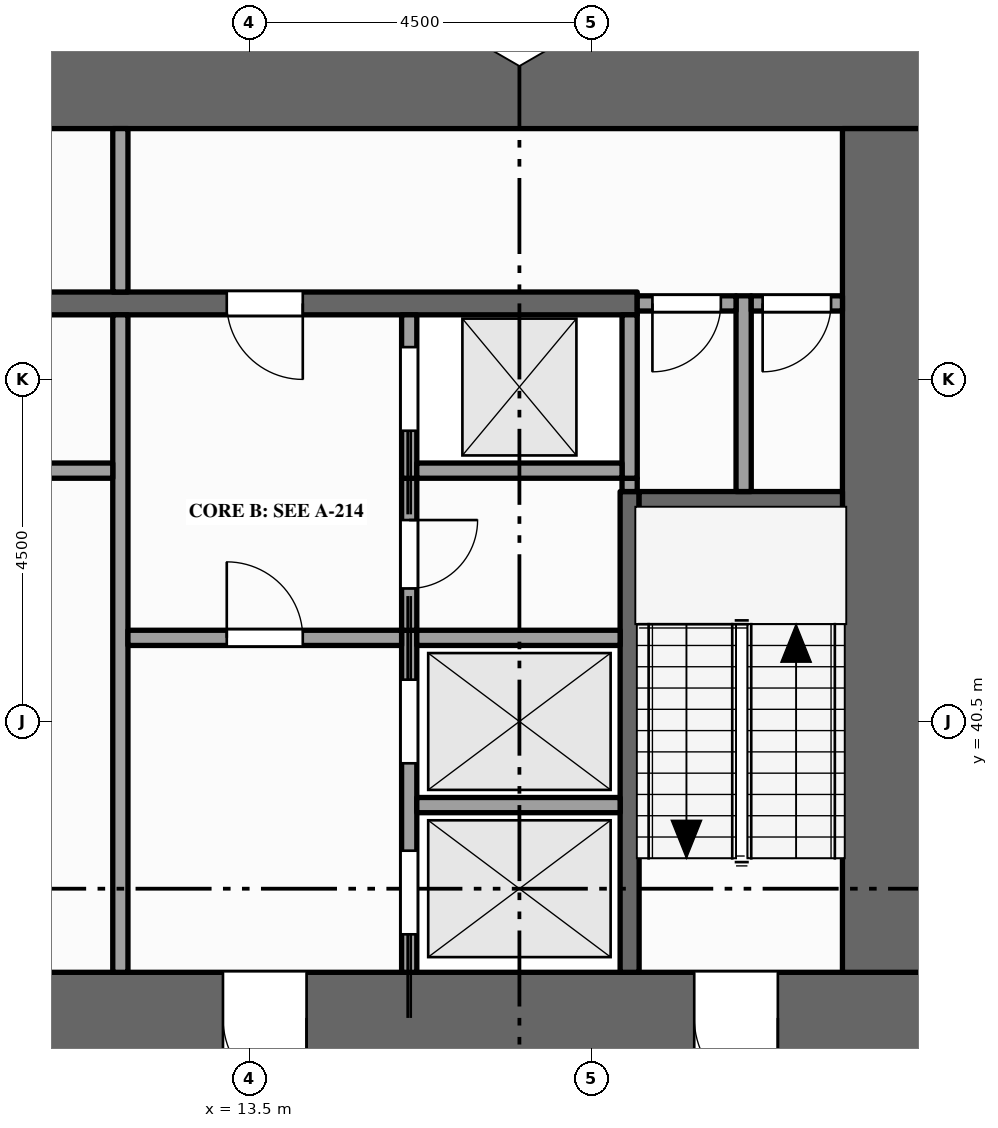
"""IFC4 building model, lengths in metres.
Left out: names, types, materials, properties, quantities, classifications, styles, units other than length and angle.
Written with IfcOpenShell. Run it as: python <this file> out.ifc"""

import sys

from ifc_helpers import new_model, si_unit, direction, frame, frame_2d, origin, place, context, subcontext, project, spatial, rectangle, extrude, element, fill, save


model = new_model("IFC4")
c1 = context("Model", 3, precision=1e-05, world=origin(), true_north=direction((0.0, 1.0)))
c2 = subcontext(c1, "Body", "Model", "MODEL_VIEW")
j1 = project(units=[si_unit("LENGTHUNIT", "METRE"), si_unit("PLANEANGLEUNIT", "RADIAN")], contexts=[c1])
p1 = place(None, origin())
s1 = spatial("IfcSite", under=j1, at=p1, CompositionType="ELEMENT")
p2 = place(p1, origin())
s2 = spatial("IfcBuilding", under=s1, at=p2, CompositionType="ELEMENT")
p3 = place(p2, frame((0.0, 0.0, 73.0)))
s3 = spatial("IfcBuildingStorey", under=s2, at=p3, CompositionType="ELEMENT", Elevation=73.0)
p4 = place(p3, frame((0.0, 36.6, -0.15), z_axis=(0.0, 0.0, 1.0), x_axis=(1.0, 0.0, 0.0)))
e1 = element("IfcWall", 1, at=p4, inside=s3, PredefinedType="SHEAR", context=c2, shape_type="SweptSolid", body=[
    extrude(rectangle(XDim=22.5, YDim=1.2, at=frame_2d((11.25, 0.0))), origin(), (0.0, 0.0, 1.0), 4.0),
])
p5 = place(p4, frame((7.1, 0.0, 0.15)))
e2 = element("IfcOpeningElement", 2, at=p5, cuts=e1, PredefinedType="OPENING", context=c2, shape_type="SweptSolid", body=[
    extrude(rectangle(XDim=1.8, YDim=2.1, at=frame_2d((0.9, 1.05))), frame((0.0, 0.61, 0.0), z_axis=(0.0, -1.0, 0.0), x_axis=(1.0, 0.0, 0.0)), (0.0, 0.0, 1.0), 1.22),
])
p6 = place(p4, frame((13.15, 0.0, 0.15)))
e3 = element("IfcOpeningElement", 3, at=p6, cuts=e1, PredefinedType="OPENING", context=c2, shape_type="SweptSolid", body=[
    extrude(rectangle(XDim=1.1, YDim=2.1, at=frame_2d((0.55, 1.05))), frame((0.0, 0.61, 0.0), z_axis=(0.0, -1.0, 0.0), x_axis=(1.0, 0.0, 0.0)), (0.0, 0.0, 1.0), 1.22),
])
p7 = place(p4, frame((2.15, 0.0, 0.15)))
e4 = element("IfcOpeningElement", 4, at=p7, cuts=e1, PredefinedType="OPENING", context=c2, shape_type="SweptSolid", body=[
    extrude(rectangle(XDim=1.1, YDim=2.1, at=frame_2d((0.55, 1.05))), frame((0.0, 0.61, 0.0), z_axis=(0.0, -1.0, 0.0), x_axis=(1.0, 0.0, 0.0)), (0.0, 0.0, 1.0), 1.22),
])
p8 = place(p4, frame((19.35, 0.0, 0.15)))
e5 = element("IfcOpeningElement", 5, at=p8, cuts=e1, PredefinedType="OPENING", context=c2, shape_type="SweptSolid", body=[
    extrude(rectangle(XDim=1.1, YDim=2.1, at=frame_2d((0.55, 1.05))), frame((0.0, 0.61, 0.0), z_axis=(0.0, -1.0, 0.0), x_axis=(1.0, 0.0, 0.0)), (0.0, 0.0, 1.0), 1.22),
])
p9 = place(p3, frame((0.0, 48.9, -0.15), z_axis=(0.0, 0.0, 1.0), x_axis=(1.0, 0.0, 0.0)))
e6 = element("IfcWall", 6, at=p9, inside=s3, PredefinedType="SHEAR", context=c2, shape_type="SweptSolid", body=[
    extrude(rectangle(XDim=22.5, YDim=1.2, at=frame_2d((11.25, 0.0))), origin(), (0.0, 0.0, 1.0), 4.0),
])
p10 = place(p3, frame((21.9, 37.2, -0.15), z_axis=(0.0, 0.0, 1.0), x_axis=(0.0, 1.0, 0.0)))
e7 = element("IfcWall", 7, at=p10, inside=s3, PredefinedType="SHEAR", context=c2, shape_type="SweptSolid", body=[
    extrude(rectangle(XDim=11.1, YDim=1.2, at=frame_2d((5.55, 0.0))), origin(), (0.0, 0.0, 1.0), 4.0),
])
p11 = place(p3, frame((11.8, 37.2, 0.0), z_axis=(0.0, 0.0, 1.0), x_axis=(0.0, 1.0, 0.0)))
e8 = element("IfcWall", 8, at=p11, inside=s3, PredefinedType="PARTITIONING", context=c2, shape_type="SweptSolid", body=[
    extrude(rectangle(XDim=8.65, YDim=0.2, at=frame_2d((4.325, 0.0))), origin(), (0.0, 0.0, 1.0), 3.75),
])
p12 = place(p3, frame((11.8, 46.15, 0.0), z_axis=(0.0, 0.0, 1.0), x_axis=(0.0, 1.0, 0.0)))
e9 = element("IfcWall", 9, at=p12, inside=s3, PredefinedType="PARTITIONING", context=c2, shape_type="SweptSolid", body=[
    extrude(rectangle(XDim=2.15, YDim=0.2, at=frame_2d((1.075, 0.0))), origin(), (0.0, 0.0, 1.0), 3.75),
])
p13 = place(p3, frame((15.6, 37.2, 0.0), z_axis=(0.0, 0.0, 1.0), x_axis=(0.0, 1.0, 0.0)))
e10 = element("IfcWall", 10, at=p13, inside=s3, PredefinedType="SOLIDWALL", context=c2, shape_type="SweptSolid", body=[
    extrude(rectangle(XDim=4.5, YDim=0.2, at=frame_2d((2.25, 0.0))), origin(), (0.0, 0.0, 1.0), 3.75),
])
p14 = place(p13, frame((0.5, 0.0, 0.012)))
e11 = element("IfcOpeningElement", 11, at=p14, cuts=e10, PredefinedType="OPENING", context=c2, shape_type="SweptSolid", body=[
    extrude(rectangle(XDim=1.1, YDim=2.1, at=frame_2d((0.55, 1.05))), frame((0.0, 0.11, 0.0), z_axis=(0.0, -1.0, 0.0), x_axis=(1.0, 0.0, 0.0)), (0.0, 0.0, 1.0), 0.22),
])
p15 = place(p13, frame((2.75, 0.0, 0.012)))
e12 = element("IfcOpeningElement", 12, at=p15, cuts=e10, PredefinedType="OPENING", context=c2, shape_type="SweptSolid", body=[
    extrude(rectangle(XDim=1.1, YDim=2.1, at=frame_2d((0.55, 1.05))), frame((0.0, 0.11, 0.0), z_axis=(0.0, -1.0, 0.0), x_axis=(1.0, 0.0, 0.0)), (0.0, 0.0, 1.0), 0.22),
])
p16 = place(p3, frame((15.6, 41.7, 0.0), z_axis=(0.0, 0.0, 1.0), x_axis=(0.0, 1.0, 0.0)))
e13 = element("IfcWall", 13, at=p16, inside=s3, PredefinedType="PARTITIONING", context=c2, shape_type="SweptSolid", body=[
    extrude(rectangle(XDim=2.0, YDim=0.2, at=frame_2d((1.0, 0.0))), origin(), (0.0, 0.0, 1.0), 3.75),
])
p17 = place(p16, frame((0.55, 0.0, 0.0)))
e14 = element("IfcOpeningElement", 14, at=p17, cuts=e13, PredefinedType="OPENING", context=c2, shape_type="SweptSolid", body=[
    extrude(rectangle(XDim=0.9, YDim=2.1, at=frame_2d((0.45, 1.05))), frame((0.0, 0.11, 0.0), z_axis=(0.0, -1.0, 0.0), x_axis=(1.0, 0.0, 0.0)), (0.0, 0.0, 1.0), 0.22),
])
p18 = place(p3, frame((15.6, 43.7, 0.0), z_axis=(0.0, 0.0, 1.0), x_axis=(0.0, 1.0, 0.0)))
e15 = element("IfcWall", 15, at=p18, inside=s3, PredefinedType="SOLIDWALL", context=c2, shape_type="SweptSolid", body=[
    extrude(rectangle(XDim=2.15, YDim=0.2, at=frame_2d((1.075, 0.0))), origin(), (0.0, 0.0, 1.0), 3.75),
])
p19 = place(p18, frame((0.625, 0.0, 0.012)))
e16 = element("IfcOpeningElement", 16, at=p19, cuts=e15, PredefinedType="OPENING", context=c2, shape_type="SweptSolid", body=[
    extrude(rectangle(XDim=1.1, YDim=2.1, at=frame_2d((0.55, 1.05))), frame((0.0, 0.11, 0.0), z_axis=(0.0, -1.0, 0.0), x_axis=(1.0, 0.0, 0.0)), (0.0, 0.0, 1.0), 0.22),
])
p20 = place(p3, frame((18.5, 37.2, 0.0), z_axis=(0.0, 0.0, 1.0), x_axis=(0.0, 1.0, 0.0)))
e17 = element("IfcWall", 17, at=p20, inside=s3, PredefinedType="SHEAR", context=c2, shape_type="SweptSolid", body=[
    extrude(rectangle(XDim=6.325, YDim=0.25, at=frame_2d((3.163, 0.0))), origin(), (0.0, 0.0, 1.0), 3.75),
])
p21 = place(p3, frame((18.5, 43.525, 0.0), z_axis=(0.0, 0.0, 1.0), x_axis=(0.0, 1.0, 0.0)))
e18 = element("IfcWall", 18, at=p21, inside=s3, PredefinedType="PARTITIONING", context=c2, shape_type="SweptSolid", body=[
    extrude(rectangle(XDim=0.175, YDim=0.2, at=frame_2d((0.087, 0.0))), origin(), (0.0, 0.0, 1.0), 3.75),
])
p22 = place(p3, frame((18.5, 43.7, 0.0), z_axis=(0.0, 0.0, 1.0), x_axis=(0.0, 1.0, 0.0)))
e19 = element("IfcWall", 19, at=p22, inside=s3, PredefinedType="SOLIDWALL", context=c2, shape_type="SweptSolid", body=[
    extrude(rectangle(XDim=2.15, YDim=0.2, at=frame_2d((1.075, 0.0))), origin(), (0.0, 0.0, 1.0), 3.75),
])
p23 = place(p3, frame((20.0, 43.525, 0.0), z_axis=(0.0, 0.0, 1.0), x_axis=(0.0, 1.0, 0.0)))
e20 = element("IfcWall", 20, at=p23, inside=s3, PredefinedType="PARTITIONING", context=c2, shape_type="SweptSolid", body=[
    extrude(rectangle(XDim=2.575, YDim=0.2, at=frame_2d((1.288, 0.0))), origin(), (0.0, 0.0, 1.0), 3.75),
])
p24 = place(p3, frame((15.7, 39.4, 0.0), z_axis=(0.0, 0.0, 1.0), x_axis=(1.0, 0.0, 0.0)))
e21 = element("IfcWall", 21, at=p24, inside=s3, PredefinedType="SOLIDWALL", context=c2, shape_type="SweptSolid", body=[
    extrude(rectangle(XDim=2.675, YDim=0.2, at=frame_2d((1.337, 0.0))), origin(), (0.0, 0.0, 1.0), 3.75),
])
p25 = place(p3, frame((11.9, 41.6, 0.0), z_axis=(0.0, 0.0, 1.0), x_axis=(1.0, 0.0, 0.0)))
e22 = element("IfcWall", 22, at=p25, inside=s3, PredefinedType="PARTITIONING", context=c2, shape_type="SweptSolid", body=[
    extrude(rectangle(XDim=3.6, YDim=0.2, at=frame_2d((1.8, 0.0))), origin(), (0.0, 0.0, 1.0), 3.75),
])
p26 = place(p25, frame((1.3, 0.0, 0.0)))
e23 = element("IfcOpeningElement", 23, at=p26, cuts=e22, PredefinedType="OPENING", context=c2, shape_type="SweptSolid", body=[
    extrude(rectangle(XDim=1.0, YDim=2.1, at=frame_2d((0.5, 1.05))), frame((0.0, 0.11, 0.0), z_axis=(0.0, -1.0, 0.0), x_axis=(1.0, 0.0, 0.0)), (0.0, 0.0, 1.0), 0.22),
])
p27 = place(p3, frame((15.7, 41.6, 0.0), z_axis=(0.0, 0.0, 1.0), x_axis=(1.0, 0.0, 0.0)))
e24 = element("IfcWall", 24, at=p27, inside=s3, PredefinedType="SOLIDWALL", context=c2, shape_type="SweptSolid", body=[
    extrude(rectangle(XDim=2.675, YDim=0.2, at=frame_2d((1.337, 0.0))), origin(), (0.0, 0.0, 1.0), 3.75),
])
p28 = place(p3, frame((18.625, 43.4, 0.0), z_axis=(0.0, 0.0, 1.0), x_axis=(1.0, 0.0, 0.0)))
e25 = element("IfcWall", 25, at=p28, inside=s3, PredefinedType="SHEAR", context=c2, shape_type="SweptSolid", body=[
    extrude(rectangle(XDim=2.675, YDim=0.25, at=frame_2d((1.337, 0.0))), origin(), (0.0, 0.0, 1.0), 3.75),
])
p29 = place(p3, frame((9.5, 43.8, 0.0), z_axis=(0.0, 0.0, 1.0), x_axis=(1.0, 0.0, 0.0)))
e26 = element("IfcWall", 26, at=p29, inside=s3, PredefinedType="PARTITIONING", context=c2, shape_type="SweptSolid", body=[
    extrude(rectangle(XDim=2.2, YDim=0.2, at=frame_2d((1.1, 0.0))), origin(), (0.0, 0.0, 1.0), 3.75),
])
p30 = place(p3, frame((15.7, 43.8, 0.0), z_axis=(0.0, 0.0, 1.0), x_axis=(1.0, 0.0, 0.0)))
e27 = element("IfcWall", 27, at=p30, inside=s3, PredefinedType="SOLIDWALL", context=c2, shape_type="SweptSolid", body=[
    extrude(rectangle(XDim=2.7, YDim=0.2, at=frame_2d((1.35, 0.0))), origin(), (0.0, 0.0, 1.0), 3.75),
])
p31 = place(p3, frame((4.1, 46.0, 0.0), z_axis=(0.0, 0.0, 1.0), x_axis=(1.0, 0.0, 0.0)))
e28 = element("IfcWall", 28, at=p31, inside=s3, PredefinedType="SHEAR", context=c2, shape_type="SweptSolid", body=[
    extrude(rectangle(XDim=14.5, YDim=0.3, at=frame_2d((7.25, 0.0))), origin(), (0.0, 0.0, 1.0), 3.75),
])
p32 = place(p31, frame((3.4, 0.0, 0.0)))
e29 = element("IfcOpeningElement", 29, at=p32, cuts=e28, PredefinedType="OPENING", context=c2, shape_type="SweptSolid", body=[
    extrude(rectangle(XDim=1.0, YDim=2.1, at=frame_2d((0.5, 1.05))), frame((0.0, 0.16, 0.0), z_axis=(0.0, -1.0, 0.0), x_axis=(1.0, 0.0, 0.0)), (0.0, 0.0, 1.0), 0.32),
])
p33 = place(p31, frame((9.1, 0.0, 0.0)))
e30 = element("IfcOpeningElement", 30, at=p33, cuts=e28, PredefinedType="OPENING", context=c2, shape_type="SweptSolid", body=[
    extrude(rectangle(XDim=1.0, YDim=2.1, at=frame_2d((0.5, 1.05))), frame((0.0, 0.16, 0.0), z_axis=(0.0, -1.0, 0.0), x_axis=(1.0, 0.0, 0.0)), (0.0, 0.0, 1.0), 0.32),
])
p34 = place(p3, frame((18.6, 46.0, 0.0), z_axis=(0.0, 0.0, 1.0), x_axis=(1.0, 0.0, 0.0)))
e31 = element("IfcWall", 31, at=p34, inside=s3, PredefinedType="PARTITIONING", context=c2, shape_type="SweptSolid", body=[
    extrude(rectangle(XDim=1.3, YDim=0.2, at=frame_2d((0.65, 0.0))), origin(), (0.0, 0.0, 1.0), 3.75),
])
p35 = place(p34, frame((0.2, 0.0, 0.0)))
e32 = element("IfcOpeningElement", 32, at=p35, cuts=e31, PredefinedType="OPENING", context=c2, shape_type="SweptSolid", body=[
    extrude(rectangle(XDim=0.9, YDim=2.1, at=frame_2d((0.45, 1.05))), frame((0.0, 0.11, 0.0), z_axis=(0.0, -1.0, 0.0), x_axis=(1.0, 0.0, 0.0)), (0.0, 0.0, 1.0), 0.22),
])
p36 = place(p3, frame((20.1, 46.0, 0.0), z_axis=(0.0, 0.0, 1.0), x_axis=(1.0, 0.0, 0.0)))
e33 = element("IfcWall", 33, at=p36, inside=s3, PredefinedType="PARTITIONING", context=c2, shape_type="SweptSolid", body=[
    extrude(rectangle(XDim=1.2, YDim=0.2, at=frame_2d((0.6, 0.0))), origin(), (0.0, 0.0, 1.0), 3.75),
])
p37 = place(p36, frame((0.15, 0.0, 0.0)))
e34 = element("IfcOpeningElement", 34, at=p37, cuts=e33, PredefinedType="OPENING", context=c2, shape_type="SweptSolid", body=[
    extrude(rectangle(XDim=0.9, YDim=2.1, at=frame_2d((0.45, 1.05))), frame((0.0, 0.11, 0.0), z_axis=(0.0, -1.0, 0.0), x_axis=(1.0, 0.0, 0.0)), (0.0, 0.0, 1.0), 0.22),
])
p38 = place(p14, origin())
e35 = element("IfcDoor", 35, at=p38, inside=s3, OperationType="SLIDING_TO_LEFT", PredefinedType="DOOR", context=c2, shape_type="SweptSolid", body=[
    extrude(rectangle(XDim=1.1, YDim=2.1, at=frame_2d((0.55, 1.05))), frame((0.0, 0.025, 0.0), z_axis=(0.0, -1.0, 0.0), x_axis=(1.0, 0.0, 0.0)), (0.0, 0.0, 1.0), 0.05),
])
fill(e11, e35)
p39 = place(p15, origin())
e36 = element("IfcDoor", 36, at=p39, inside=s3, OperationType="SLIDING_TO_RIGHT", PredefinedType="DOOR", context=c2, shape_type="SweptSolid", body=[
    extrude(rectangle(XDim=1.1, YDim=2.1, at=frame_2d((0.55, 1.05))), frame((0.0, 0.025, 0.0), z_axis=(0.0, -1.0, 0.0), x_axis=(1.0, 0.0, 0.0)), (0.0, 0.0, 1.0), 0.05),
])
fill(e12, e36)
p40 = place(p19, origin())
e37 = element("IfcDoor", 37, at=p40, inside=s3, OperationType="SLIDING_TO_LEFT", PredefinedType="DOOR", context=c2, shape_type="SweptSolid", body=[
    extrude(rectangle(XDim=1.1, YDim=2.1, at=frame_2d((0.55, 1.05))), frame((0.0, 0.025, 0.0), z_axis=(0.0, -1.0, 0.0), x_axis=(1.0, 0.0, 0.0)), (0.0, 0.0, 1.0), 0.05),
])
fill(e16, e37)
p41 = place(p6, origin())
e38 = element("IfcDoor", 38, at=p41, inside=s3, OperationType="SINGLE_SWING_RIGHT", PredefinedType="DOOR", context=c2, shape_type="SweptSolid", body=[
    extrude(rectangle(XDim=1.1, YDim=2.1, at=frame_2d((0.55, 1.05))), frame((0.0, 0.025, 0.0), z_axis=(0.0, -1.0, 0.0), x_axis=(1.0, 0.0, 0.0)), (0.0, 0.0, 1.0), 0.05),
])
fill(e3, e38)
p42 = place(p26, origin())
e39 = element("IfcDoor", 39, at=p42, inside=s3, OperationType="SINGLE_SWING_LEFT", PredefinedType="DOOR", context=c2, shape_type="SweptSolid", body=[
    extrude(rectangle(XDim=1.0, YDim=2.1, at=frame_2d((0.5, 1.05))), frame((0.0, 0.025, 0.0), z_axis=(0.0, -1.0, 0.0), x_axis=(1.0, 0.0, 0.0)), (0.0, 0.0, 1.0), 0.05),
])
fill(e23, e39)
p43 = place(p33, origin())
e40 = element("IfcDoor", 40, at=p43, inside=s3, OperationType="SINGLE_SWING_RIGHT", PredefinedType="DOOR", context=c2, shape_type="SweptSolid", body=[
    extrude(rectangle(XDim=1.0, YDim=2.1, at=frame_2d((0.5, 1.05))), frame((0.0, 0.025, 0.0), z_axis=(0.0, -1.0, 0.0), x_axis=(1.0, 0.0, 0.0)), (0.0, 0.0, 1.0), 0.05),
])
fill(e30, e40)
p44 = place(p8, origin())
e41 = element("IfcDoor", 41, at=p44, inside=s3, OperationType="SINGLE_SWING_RIGHT", PredefinedType="DOOR", context=c2, shape_type="SweptSolid", body=[
    extrude(rectangle(XDim=1.1, YDim=2.1, at=frame_2d((0.55, 1.05))), frame((0.0, 0.025, 0.0), z_axis=(0.0, -1.0, 0.0), x_axis=(1.0, 0.0, 0.0)), (0.0, 0.0, 1.0), 0.05),
])
fill(e5, e41)
p45 = place(p35, origin())
e42 = element("IfcDoor", 42, at=p45, inside=s3, OperationType="SINGLE_SWING_LEFT", PredefinedType="DOOR", context=c2, shape_type="SweptSolid", body=[
    extrude(rectangle(XDim=0.9, YDim=2.1, at=frame_2d((0.45, 1.05))), frame((0.0, 0.025, 0.0), z_axis=(0.0, -1.0, 0.0), x_axis=(1.0, 0.0, 0.0)), (0.0, 0.0, 1.0), 0.05),
])
fill(e32, e42)
p46 = place(p37, origin())
e43 = element("IfcDoor", 43, at=p46, inside=s3, OperationType="SINGLE_SWING_LEFT", PredefinedType="DOOR", context=c2, shape_type="SweptSolid", body=[
    extrude(rectangle(XDim=0.9, YDim=2.1, at=frame_2d((0.45, 1.05))), frame((0.0, 0.025, 0.0), z_axis=(0.0, -1.0, 0.0), x_axis=(1.0, 0.0, 0.0)), (0.0, 0.0, 1.0), 0.05),
])
fill(e34, e43)
p47 = place(p17, origin())
e44 = element("IfcDoor", 44, at=p47, inside=s3, OperationType="SINGLE_SWING_RIGHT", PredefinedType="DOOR", context=c2, shape_type="SweptSolid", body=[
    extrude(rectangle(XDim=0.9, YDim=2.1, at=frame_2d((0.45, 1.05))), frame((0.0, 0.025, 0.0), z_axis=(0.0, -1.0, 0.0), x_axis=(1.0, 0.0, 0.0)), (0.0, 0.0, 1.0), 0.05),
])
fill(e14, e44)
save(model, sys.argv[1])
